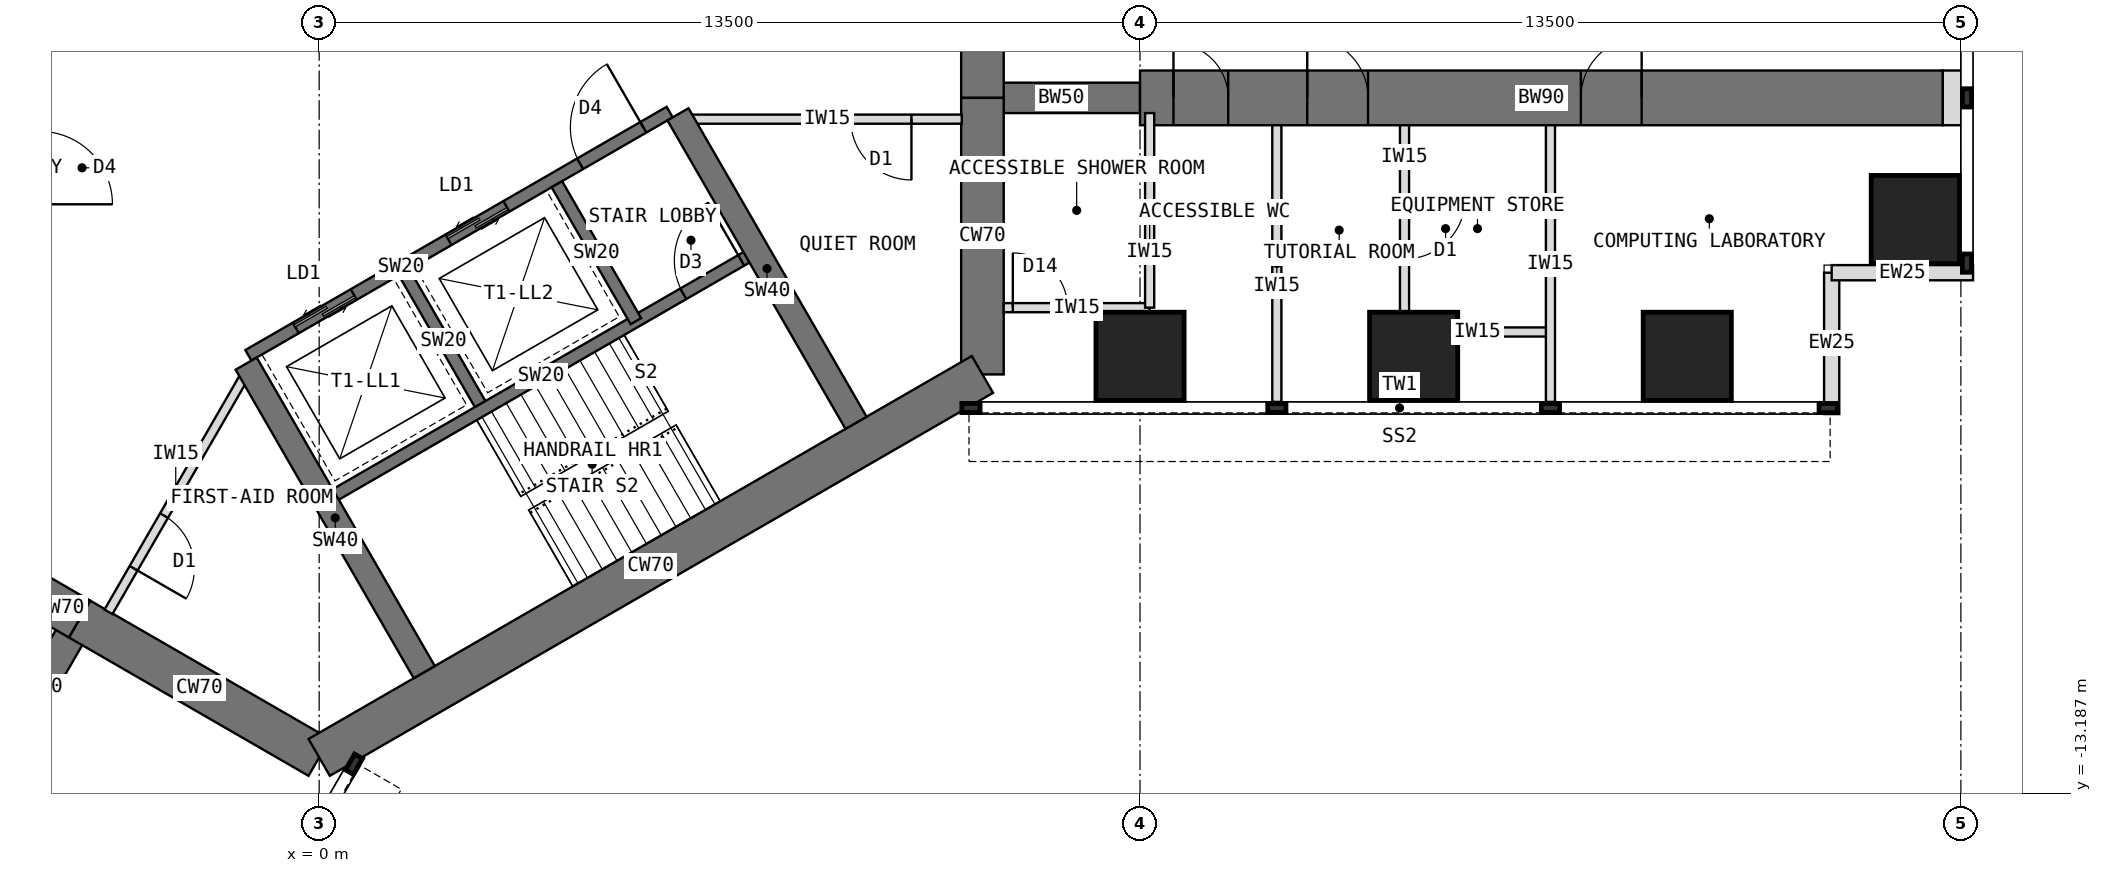
"""IFC4 building model, lengths in metres.
Left out: names, types, materials, properties, quantities, classifications, styles, units other than length and angle.
Written with IfcOpenShell. Run it as: python <this file> out.ifc"""

import sys

from ifc_helpers import new_model, si_unit, direction, frame, frame_2d, origin, origin_2d, place, context, subcontext, project, spatial, rectangle, extrude, element, fill, save


model = new_model("IFC4")
c1 = context("Model", 3, precision=1e-05, world=origin(), true_north=direction((0.0, 1.0)))
c2 = subcontext(c1, "Body", "Model", "MODEL_VIEW")
j1 = project(units=[si_unit("LENGTHUNIT", "METRE"), si_unit("PLANEANGLEUNIT", "RADIAN")], contexts=[c1])
p1 = place(None, origin())
s1 = spatial("IfcSite", under=j1, at=p1, CompositionType="ELEMENT")
p2 = place(p1, origin())
s2 = spatial("IfcBuilding", under=s1, at=p2, CompositionType="ELEMENT")
p3 = place(p2, frame((0.0, 0.0, 68.5)))
s3 = spatial("IfcBuildingStorey", under=s2, at=p3, CompositionType="ELEMENT", Elevation=68.5)
p4 = place(p3, frame((10.908, -6.298, 0.0), z_axis=(0.0, 0.0, 1.0), x_axis=(0.0, 1.0, 0.0)))
e1 = element("IfcWall", 1, at=p4, inside=s3, PredefinedType="SHEAR", context=c2, shape_type="SweptSolid", body=[
    extrude(rectangle(XDim=4.548, YDim=0.7, at=frame_2d((2.274, 0.0))), origin(), (0.0, 0.0, 1.0), 4.0),
])
p5 = place(p3, frame((10.908, -1.75, 0.0), z_axis=(0.0, 0.0, 1.0), x_axis=(0.0, 1.0, 0.0)))
e2 = element("IfcWall", 2, at=p5, inside=s3, PredefinedType="SHEAR", context=c2, shape_type="SweptSolid", body=[
    extrude(rectangle(XDim=3.5, YDim=0.7, at=frame_2d((1.75, 0.0))), origin(), (0.0, 0.0, 1.0), 4.0),
])
p6 = place(p5, frame((0.85, 0.0, 0.0)))
e3 = element("IfcOpeningElement", 3, at=p6, cuts=e2, PredefinedType="OPENING", context=c2, shape_type="SweptSolid", body=[
    extrude(rectangle(XDim=1.8, YDim=2.1, at=frame_2d((0.9, 1.05))), frame((0.0, 0.36, 0.0), z_axis=(0.0, -1.0, 0.0), x_axis=(1.0, 0.0, 0.0)), (0.0, 0.0, 1.0), 0.72),
])
p7 = place(p3, frame((-6.97, -8.572, 0.0), z_axis=(0.0, 0.0, 1.0), x_axis=(0.866019471182, -0.500010275428, 0.0)))
e4 = element("IfcWall", 4, at=p7, inside=s3, PredefinedType="SHEAR", context=c2, shape_type="SweptSolid", body=[
    extrude(rectangle(XDim=3.5, YDim=0.7, at=frame_2d((1.75, 0.0))), origin(), (0.0, 0.0, 1.0), 4.0),
])
p8 = place(p7, frame((0.85, 0.0, 0.0)))
e5 = element("IfcOpeningElement", 5, at=p8, cuts=e4, PredefinedType="OPENING", context=c2, shape_type="SweptSolid", body=[
    extrude(rectangle(XDim=1.8, YDim=2.1, at=frame_2d((0.9, 1.05))), frame((0.0, 0.36, 0.0), z_axis=(0.0, -1.0, 0.0), x_axis=(1.0, 0.0, 0.0)), (0.0, 0.0, 1.0), 0.72),
])
p9 = place(p3, frame((-3.939, -10.322, 0.0), z_axis=(0.0, 0.0, 1.0), x_axis=(0.866011268655, -0.500024481964, 0.0)))
e6 = element("IfcWall", 6, at=p9, inside=s3, PredefinedType="SHEAR", context=c2, shape_type="SweptSolid", body=[
    extrude(rectangle(XDim=4.548, YDim=0.7, at=frame_2d((2.274, 0.0))), origin(), (0.0, 0.0, 1.0), 4.0),
])
p10 = place(p3, frame((0.0, -12.596, 0.0), z_axis=(0.0, 0.0, 1.0), x_axis=(0.866021940709, 0.500005998175, 0.0)))
e7 = element("IfcWall", 7, at=p10, inside=s3, PredefinedType="SHEAR", context=c2, shape_type="SweptSolid", body=[
    extrude(rectangle(XDim=12.596, YDim=0.7, at=frame_2d((6.298, 0.0))), origin(), (0.0, 0.0, 1.0), 4.0),
])
p11 = place(p3, frame((10.908, -1.75, 0.0), z_axis=(0.0, 0.0, 1.0), x_axis=(1.0, 0.0, 0.0)))
e8 = element("IfcWall", 8, at=p11, inside=s3, PredefinedType="SHEAR", context=c2, shape_type="SweptSolid", body=[
    extrude(rectangle(XDim=2.592, YDim=0.5, at=frame_2d((1.296, 0.0))), origin(), (0.0, 0.0, 1.0), 4.0),
])
p12 = place(p3, frame((13.5, -1.75, 0.0), z_axis=(0.0, 0.0, 1.0), x_axis=(1.0, 0.0, 0.0)))
e9 = element("IfcWall", 9, at=p12, inside=s3, PredefinedType="SHEAR", context=c2, shape_type="SweptSolid", body=[
    extrude(rectangle(XDim=13.2, YDim=0.9, at=frame_2d((6.6, 0.0))), origin(), (0.0, 0.0, 1.0), 4.0),
])
p13 = place(p12, frame((0.55, 0.0, 0.0)))
e10 = element("IfcOpeningElement", 10, at=p13, cuts=e9, PredefinedType="OPENING", context=c2, shape_type="SweptSolid", body=[
    extrude(rectangle(XDim=0.9, YDim=2.1, at=frame_2d((0.45, 1.05))), frame((0.0, 0.46, 0.0), z_axis=(0.0, -1.0, 0.0), x_axis=(1.0, 0.0, 0.0)), (0.0, 0.0, 1.0), 0.92),
])
p14 = place(p12, frame((2.75, 0.0, 0.0)))
e11 = element("IfcOpeningElement", 11, at=p14, cuts=e9, PredefinedType="OPENING", context=c2, shape_type="SweptSolid", body=[
    extrude(rectangle(XDim=1.0, YDim=2.1, at=frame_2d((0.5, 1.05))), frame((0.0, 0.46, 0.0), z_axis=(0.0, -1.0, 0.0), x_axis=(1.0, 0.0, 0.0)), (0.0, 0.0, 1.0), 0.92),
])
p15 = place(p12, frame((7.25, 0.0, 0.0)))
e12 = element("IfcOpeningElement", 12, at=p15, cuts=e9, PredefinedType="OPENING", context=c2, shape_type="SweptSolid", body=[
    extrude(rectangle(XDim=1.0, YDim=2.1, at=frame_2d((0.5, 1.05))), frame((0.0, 0.46, 0.0), z_axis=(0.0, -1.0, 0.0), x_axis=(1.0, 0.0, 0.0)), (0.0, 0.0, 1.0), 0.92),
])
p16 = place(p3, frame((-3.939, -10.322, 0.0), z_axis=(0.0, 0.0, 1.0), x_axis=(-0.499918158782, -0.866072649678, 0.0)))
e13 = element("IfcWall", 13, at=p16, inside=s3, PredefinedType="SHEAR", context=c2, shape_type="SweptSolid", body=[
    extrude(rectangle(XDim=2.592, YDim=0.5, at=frame_2d((1.296, 0.0))), origin(), (0.0, 0.0, 1.0), 4.0),
])
for number, where, z_axis, x_axis in (
    (14, (13.5, -6.0, 0.0), (0.0, 0.0, 1.0), (1.0, 0.0, 0.0)),
    (15, (18.0, -6.0, 0.0), (0.0, 0.0, 1.0), (1.0, 0.0, 0.0)),
    (16, (22.5, -6.0, 0.0), (0.0, 0.0, 1.0), (1.0, 0.0, 0.0)),
    (17, (26.25, -3.75, 0.0), (0.0, 0.0, 1.0), (1.0, 0.0, 0.0)),
):
    element("IfcColumn", number, at=place(p3, frame(where, z_axis=z_axis, x_axis=x_axis)), inside=s3, PredefinedType="COLUMN", context=c2, shape_type="SweptSolid", body=[
        extrude(rectangle(XDim=1.45, YDim=1.45, at=origin_2d()), origin(), (0.0, 0.0, 1.0), 4.0),
    ])
for number, where, z_axis, x_axis in (
    (18, (24.875, -6.95, 0.0), (0.0, 0.0, 1.0), (0.0, 1.0, 0.0)),
    (19, (24.875, -4.625, 0.0), (0.0, 0.0, 1.0), (1.0, 0.0, 0.0)),
):
    element("IfcWall", number, at=place(p3, frame(where, z_axis=z_axis, x_axis=x_axis)), inside=s3, PredefinedType="STANDARD", context=c2, shape_type="SweptSolid", body=[
        extrude(rectangle(XDim=2.325, YDim=0.25, at=frame_2d((1.163, 0.0))), origin(), (0.0, 0.0, 1.0), 3.8),
    ])
p17 = place(p3, frame((26.7, -1.75, 0.0), z_axis=(0.0, 0.0, 1.0), x_axis=(1.0, 0.0, 0.0)))
e20 = element("IfcWall", 20, at=p17, inside=s3, PredefinedType="PARTITIONING", context=c2, shape_type="SweptSolid", body=[
    extrude(rectangle(XDim=0.31, YDim=0.9, at=frame_2d((0.155, 0.0))), origin(), (0.0, 0.0, 1.0), 3.8),
])
p18 = place(p3, frame((-1.164, -5.984, 0.0), z_axis=(0.0, 0.0, 1.0), x_axis=(0.866026010844, 0.49999894854, 0.0)))
e21 = element("IfcWall", 21, at=p18, inside=s3, PredefinedType="SHEAR", context=c2, shape_type="SweptSolid", body=[
    extrude(rectangle(XDim=8.0, YDim=0.2, at=frame_2d((4.0, 0.0))), origin(), (0.0, 0.0, 1.0), 4.0),
])
p19 = place(p18, frame((6.3, 0.0, 0.0)))
e22 = element("IfcOpeningElement", 22, at=p19, cuts=e21, PredefinedType="OPENING", context=c2, shape_type="SweptSolid", body=[
    extrude(rectangle(XDim=1.2, YDim=2.1, at=frame_2d((0.6, 1.05))), frame((0.0, 0.11, 0.0), z_axis=(0.0, -1.0, 0.0), x_axis=(1.0, 0.0, 0.0)), (0.0, 0.0, 1.0), 0.22),
])
p20 = place(p18, frame((0.9, 0.0, 0.0)))
e23 = element("IfcOpeningElement", 23, at=p20, cuts=e21, PredefinedType="OPENING", context=c2, shape_type="SweptSolid", body=[
    extrude(rectangle(XDim=1.1, YDim=2.2, at=frame_2d((0.55, 1.1))), frame((0.0, 0.11, 0.0), z_axis=(0.0, -1.0, 0.0), x_axis=(1.0, 0.0, 0.0)), (0.0, 0.0, 1.0), 0.22),
])
p21 = place(p18, frame((3.8, 0.0, 0.0)))
e24 = element("IfcOpeningElement", 24, at=p21, cuts=e21, PredefinedType="OPENING", context=c2, shape_type="SweptSolid", body=[
    extrude(rectangle(XDim=1.1, YDim=2.2, at=frame_2d((0.55, 1.1))), frame((0.0, 0.11, 0.0), z_axis=(0.0, -1.0, 0.0), x_axis=(1.0, 0.0, 0.0)), (0.0, 0.0, 1.0), 0.22),
])
p22 = place(p3, frame((1.397, -4.62, 0.0), z_axis=(0.0, 0.0, 1.0), x_axis=(0.499936506574, -0.866062058628, 0.0)))
e25 = element("IfcWall", 25, at=p22, inside=s3, PredefinedType="SHEAR", context=c2, shape_type="SweptSolid", body=[
    extrude(rectangle(XDim=2.6, YDim=0.2, at=frame_2d((1.3, 0.0))), origin(), (0.0, 0.0, 1.0), 4.0),
])
p23 = place(p3, frame((3.909, -3.17, 0.0), z_axis=(0.0, 0.0, 1.0), x_axis=(0.49997716683, -0.86603858612, 0.0)))
e26 = element("IfcWall", 26, at=p23, inside=s3, PredefinedType="SHEAR", context=c2, shape_type="SweptSolid", body=[
    extrude(rectangle(XDim=2.6, YDim=0.2, at=frame_2d((1.3, 0.0))), origin(), (0.0, 0.0, 1.0), 4.0),
])
p24 = place(p3, frame((0.186, -8.322, 0.0), z_axis=(0.0, 0.0, 1.0), x_axis=(0.866026010844, 0.49999894854, 0.0)))
e27 = element("IfcWall", 27, at=p24, inside=s3, PredefinedType="SHEAR", context=c2, shape_type="SweptSolid", body=[
    extrude(rectangle(XDim=8.0, YDim=0.2, at=frame_2d((4.0, 0.0))), origin(), (0.0, 0.0, 1.0), 4.0),
])
p25 = place(p24, frame((6.7, 0.0, 0.0)))
e28 = element("IfcOpeningElement", 28, at=p25, cuts=e27, PredefinedType="OPENING", context=c2, shape_type="SweptSolid", body=[
    extrude(rectangle(XDim=1.1, YDim=2.1, at=frame_2d((0.55, 1.05))), frame((0.0, 0.11, 0.0), z_axis=(0.0, -1.0, 0.0), x_axis=(1.0, 0.0, 0.0)), (0.0, 0.0, 1.0), 0.22),
])
for number, where, z_axis, x_axis in (
    (29, (5.901, -2.02, 0.0), (0.0, 0.0, 1.0), (0.5, -0.866, 0.0)),
    (30, (-1.201, -6.12, 0.0), (0.0, 0.0, 1.0), (0.5, -0.866, 0.0)),
):
    element("IfcWall", number, at=place(p3, frame(where, z_axis=z_axis, x_axis=x_axis)), inside=s3, PredefinedType="SHEAR", context=c2, shape_type="SweptSolid", body=[
        extrude(rectangle(XDim=5.858, YDim=0.4, at=frame_2d((2.929, 0.0))), origin(), (0.0, 0.0, 1.0), 4.0),
    ])
for number, where, z_axis, x_axis in (
    (31, (15.75, -2.2, 0.0), (0.0, 0.0, 1.0), (0.0, -1.0, 0.0)),
    (32, (20.25, -2.2, 0.0), (0.0, 0.0, 1.0), (0.0, -1.0, 0.0)),
):
    element("IfcWall", number, at=place(p3, frame(where, z_axis=z_axis, x_axis=x_axis)), inside=s3, PredefinedType="PARTITIONING", context=c2, shape_type="SweptSolid", body=[
        extrude(rectangle(XDim=4.55, YDim=0.15, at=frame_2d((2.275, 0.0))), origin(), (0.0, 0.0, 1.0), 3.8),
    ])
p26 = place(p3, frame((17.85, -5.6, 0.0), z_axis=(0.0, 0.0, 1.0), x_axis=(1.0, 0.0, 0.0)))
e33 = element("IfcWall", 33, at=p26, inside=s3, PredefinedType="PARTITIONING", context=c2, shape_type="SweptSolid", body=[
    extrude(rectangle(XDim=2.4, YDim=0.15, at=frame_2d((1.2, 0.0))), origin(), (0.0, 0.0, 1.0), 3.8),
])
p27 = place(p3, frame((17.85, -2.2, 0.0), z_axis=(0.0, 0.0, 1.0), x_axis=(0.0, -1.0, 0.0)))
e34 = element("IfcWall", 34, at=p27, inside=s3, PredefinedType="PARTITIONING", context=c2, shape_type="SweptSolid", body=[
    extrude(rectangle(XDim=3.4, YDim=0.15, at=frame_2d((1.7, 0.0))), origin(), (0.0, 0.0, 1.0), 3.8),
])
p28 = place(p27, frame((1.2, 0.0, 0.0)))
e35 = element("IfcOpeningElement", 35, at=p28, cuts=e34, PredefinedType="OPENING", context=c2, shape_type="SweptSolid", body=[
    extrude(rectangle(XDim=1.0, YDim=2.1, at=frame_2d((0.5, 1.05))), frame((0.0, 0.085, 0.0), z_axis=(0.0, -1.0, 0.0), x_axis=(1.0, 0.0, 0.0)), (0.0, 0.0, 1.0), 0.17),
])
p29 = place(p3, frame((11.258, -5.2, 0.0), z_axis=(0.0, 0.0, 1.0), x_axis=(1.0, 0.0, 0.0)))
e36 = element("IfcWall", 36, at=p29, inside=s3, PredefinedType="PARTITIONING", context=c2, shape_type="SweptSolid", body=[
    extrude(rectangle(XDim=2.4, YDim=0.15, at=frame_2d((1.2, 0.0))), origin(), (0.0, 0.0, 1.0), 3.8),
])
p30 = place(p29, frame((0.15, 0.0, 0.0)))
e37 = element("IfcOpeningElement", 37, at=p30, cuts=e36, PredefinedType="OPENING", context=c2, shape_type="SweptSolid", body=[
    extrude(rectangle(XDim=0.9, YDim=2.1, at=frame_2d((0.45, 1.05))), frame((0.0, 0.085, 0.0), z_axis=(0.0, -1.0, 0.0), x_axis=(1.0, 0.0, 0.0)), (0.0, 0.0, 1.0), 0.17),
])
p31 = place(p3, frame((13.658, -2.0, 0.0), z_axis=(0.0, 0.0, 1.0), x_axis=(0.0, -1.0, 0.0)))
e38 = element("IfcWall", 38, at=p31, inside=s3, PredefinedType="PARTITIONING", context=c2, shape_type="SweptSolid", body=[
    extrude(rectangle(XDim=3.2, YDim=0.15, at=frame_2d((1.6, 0.0))), origin(), (0.0, 0.0, 1.0), 3.8),
])
p32 = place(p3, frame((-1.253, -6.37, 0.0), z_axis=(0.0, 0.0, 1.0), x_axis=(-0.500007369519, -0.866021148949, 0.0)))
e39 = element("IfcWall", 39, at=p32, inside=s3, PredefinedType="PARTITIONING", context=c2, shape_type="SweptSolid", body=[
    extrude(rectangle(XDim=4.426, YDim=0.15, at=frame_2d((2.213, 0.0))), origin(), (0.0, 0.0, 1.0), 3.8),
])
p33 = place(p32, frame((2.598, 0.0, 0.0)))
e40 = element("IfcOpeningElement", 40, at=p33, cuts=e39, PredefinedType="OPENING", context=c2, shape_type="SweptSolid", body=[
    extrude(rectangle(XDim=1.0, YDim=2.1, at=frame_2d((0.5, 1.05))), frame((0.0, 0.085, 0.0), z_axis=(0.0, -1.0, 0.0), x_axis=(1.0, 0.0, 0.0)), (0.0, 0.0, 1.0), 0.17),
])
p34 = place(p3, frame((10.568, -2.1, 0.0), z_axis=(0.0, 0.0, 1.0), x_axis=(-1.0, 0.0, 0.0)))
e41 = element("IfcWall", 41, at=p34, inside=s3, PredefinedType="PARTITIONING", context=c2, shape_type="SweptSolid", body=[
    extrude(rectangle(XDim=4.426, YDim=0.15, at=frame_2d((2.213, 0.0))), origin(), (0.0, 0.0, 1.0), 3.8),
])
p35 = place(p34, frame((0.828, 0.0, 0.0)))
e42 = element("IfcOpeningElement", 42, at=p35, cuts=e41, PredefinedType="OPENING", context=c2, shape_type="SweptSolid", body=[
    extrude(rectangle(XDim=1.0, YDim=2.1, at=frame_2d((0.5, 1.05))), frame((0.0, 0.085, 0.0), z_axis=(0.0, -1.0, 0.0), x_axis=(1.0, 0.0, 0.0)), (0.0, 0.0, 1.0), 0.17),
])
p36 = place(p19, origin())
e43 = element("IfcDoor", 43, at=p36, inside=s3, OperationType="SINGLE_SWING_RIGHT", PredefinedType="DOOR", context=c2, shape_type="SweptSolid", body=[
    extrude(rectangle(XDim=1.2, YDim=2.1, at=frame_2d((0.6, 1.05))), frame((0.0, 0.025, 0.0), z_axis=(0.0, -1.0, 0.0), x_axis=(1.0, 0.0, 0.0)), (0.0, 0.0, 1.0), 0.05),
])
fill(e22, e43)
p37 = place(p20, origin())
e44 = element("IfcDoor", 44, at=p37, inside=s3, OperationType="DOUBLE_DOOR_SLIDING", PredefinedType="DOOR", context=c2, shape_type="SweptSolid", body=[
    extrude(rectangle(XDim=1.1, YDim=2.2, at=frame_2d((0.55, 1.1))), frame((0.0, 0.025, 0.0), z_axis=(0.0, -1.0, 0.0), x_axis=(1.0, 0.0, 0.0)), (0.0, 0.0, 1.0), 0.05),
])
fill(e23, e44)
p38 = place(p21, origin())
e45 = element("IfcDoor", 45, at=p38, inside=s3, OperationType="DOUBLE_DOOR_SLIDING", PredefinedType="DOOR", context=c2, shape_type="SweptSolid", body=[
    extrude(rectangle(XDim=1.1, YDim=2.2, at=frame_2d((0.55, 1.1))), frame((0.0, 0.025, 0.0), z_axis=(0.0, -1.0, 0.0), x_axis=(1.0, 0.0, 0.0)), (0.0, 0.0, 1.0), 0.05),
])
fill(e24, e45)
p39 = place(p25, origin())
e46 = element("IfcDoor", 46, at=p39, inside=s3, OperationType="SINGLE_SWING_RIGHT", PredefinedType="DOOR", context=c2, shape_type="SweptSolid", body=[
    extrude(rectangle(XDim=1.1, YDim=2.1, at=frame_2d((0.55, 1.05))), frame((0.0, 0.025, 0.0), z_axis=(0.0, -1.0, 0.0), x_axis=(1.0, 0.0, 0.0)), (0.0, 0.0, 1.0), 0.05),
])
fill(e28, e46)
p40 = place(p28, origin())
e47 = element("IfcDoor", 47, at=p40, inside=s3, OperationType="SINGLE_SWING_LEFT", PredefinedType="DOOR", context=c2, shape_type="SweptSolid", body=[
    extrude(rectangle(XDim=1.0, YDim=2.1, at=frame_2d((0.5, 1.05))), frame((0.0, 0.025, 0.0), z_axis=(0.0, -1.0, 0.0), x_axis=(1.0, 0.0, 0.0)), (0.0, 0.0, 1.0), 0.05),
])
fill(e35, e47)
p41 = place(p30, origin())
e48 = element("IfcDoor", 48, at=p41, inside=s3, OperationType="SINGLE_SWING_LEFT", PredefinedType="DOOR", context=c2, shape_type="SweptSolid", body=[
    extrude(rectangle(XDim=0.9, YDim=2.1, at=frame_2d((0.45, 1.05))), frame((0.0, 0.025, 0.0), z_axis=(0.0, -1.0, 0.0), x_axis=(1.0, 0.0, 0.0)), (0.0, 0.0, 1.0), 0.05),
])
fill(e37, e48)
p42 = place(p33, origin())
e49 = element("IfcDoor", 49, at=p42, inside=s3, OperationType="SINGLE_SWING_RIGHT", PredefinedType="DOOR", context=c2, shape_type="SweptSolid", body=[
    extrude(rectangle(XDim=1.0, YDim=2.1, at=frame_2d((0.5, 1.05))), frame((0.0, 0.025, 0.0), z_axis=(0.0, -1.0, 0.0), x_axis=(1.0, 0.0, 0.0)), (0.0, 0.0, 1.0), 0.05),
])
fill(e40, e49)
p43 = place(p35, origin())
e50 = element("IfcDoor", 50, at=p43, inside=s3, OperationType="SINGLE_SWING_LEFT", PredefinedType="DOOR", context=c2, shape_type="SweptSolid", body=[
    extrude(rectangle(XDim=1.0, YDim=2.1, at=frame_2d((0.5, 1.05))), frame((0.0, 0.025, 0.0), z_axis=(0.0, -1.0, 0.0), x_axis=(1.0, 0.0, 0.0)), (0.0, 0.0, 1.0), 0.05),
])
fill(e42, e50)
p44 = place(p13, origin())
e51 = element("IfcDoor", 51, at=p44, inside=s3, OperationType="SINGLE_SWING_LEFT", PredefinedType="DOOR", context=c2, shape_type="SweptSolid", body=[
    extrude(rectangle(XDim=0.82, YDim=2.06, at=frame_2d((0.45, 1.03))), frame((0.0, 0.025, 0.0), z_axis=(0.0, -1.0, 0.0), x_axis=(1.0, 0.0, 0.0)), (0.0, 0.0, 1.0), 0.05),
    extrude(rectangle(XDim=0.04, YDim=2.1, at=frame_2d((0.02, 1.05))), frame((0.0, 0.45, 0.0), z_axis=(0.0, -1.0, 0.0), x_axis=(1.0, 0.0, 0.0)), (0.0, 0.0, 1.0), 0.899),
    extrude(rectangle(XDim=0.04, YDim=2.1, at=frame_2d((0.88, 1.05))), frame((0.0, 0.45, 0.0), z_axis=(0.0, -1.0, 0.0), x_axis=(1.0, 0.0, 0.0)), (0.0, 0.0, 1.0), 0.899),
    extrude(rectangle(XDim=0.82, YDim=0.04, at=frame_2d((0.45, 2.08))), frame((0.0, 0.45, 0.0), z_axis=(0.0, -1.0, 0.0), x_axis=(1.0, 0.0, 0.0)), (0.0, 0.0, 1.0), 0.899),
])
fill(e10, e51)
p45 = place(p14, origin())
e52 = element("IfcDoor", 52, at=p45, inside=s3, OperationType="SINGLE_SWING_LEFT", PredefinedType="DOOR", context=c2, shape_type="SweptSolid", body=[
    extrude(rectangle(XDim=0.92, YDim=2.06, at=frame_2d((0.5, 1.03))), frame((0.0, 0.025, 0.0), z_axis=(0.0, -1.0, 0.0), x_axis=(1.0, 0.0, 0.0)), (0.0, 0.0, 1.0), 0.05),
    extrude(rectangle(XDim=0.04, YDim=2.1, at=frame_2d((0.02, 1.05))), frame((0.0, 0.45, 0.0), z_axis=(0.0, -1.0, 0.0), x_axis=(1.0, 0.0, 0.0)), (0.0, 0.0, 1.0), 0.899),
    extrude(rectangle(XDim=0.04, YDim=2.1, at=frame_2d((0.98, 1.05))), frame((0.0, 0.45, 0.0), z_axis=(0.0, -1.0, 0.0), x_axis=(1.0, 0.0, 0.0)), (0.0, 0.0, 1.0), 0.899),
    extrude(rectangle(XDim=0.92, YDim=0.04, at=frame_2d((0.5, 2.08))), frame((0.0, 0.45, 0.0), z_axis=(0.0, -1.0, 0.0), x_axis=(1.0, 0.0, 0.0)), (0.0, 0.0, 1.0), 0.899),
])
fill(e11, e52)
p46 = place(p15, origin())
e53 = element("IfcDoor", 53, at=p46, inside=s3, OperationType="SINGLE_SWING_RIGHT", PredefinedType="DOOR", context=c2, shape_type="SweptSolid", body=[
    extrude(rectangle(XDim=0.92, YDim=2.06, at=frame_2d((0.5, 1.03))), frame((0.0, 0.025, 0.0), z_axis=(0.0, -1.0, 0.0), x_axis=(1.0, 0.0, 0.0)), (0.0, 0.0, 1.0), 0.05),
    extrude(rectangle(XDim=0.04, YDim=2.1, at=frame_2d((0.02, 1.05))), frame((0.0, 0.45, 0.0), z_axis=(0.0, -1.0, 0.0), x_axis=(1.0, 0.0, 0.0)), (0.0, 0.0, 1.0), 0.899),
    extrude(rectangle(XDim=0.04, YDim=2.1, at=frame_2d((0.98, 1.05))), frame((0.0, 0.45, 0.0), z_axis=(0.0, -1.0, 0.0), x_axis=(1.0, 0.0, 0.0)), (0.0, 0.0, 1.0), 0.899),
    extrude(rectangle(XDim=0.92, YDim=0.04, at=frame_2d((0.5, 2.08))), frame((0.0, 0.45, 0.0), z_axis=(0.0, -1.0, 0.0), x_axis=(1.0, 0.0, 0.0)), (0.0, 0.0, 1.0), 0.899),
])
fill(e12, e53)
save(model, sys.argv[1])
